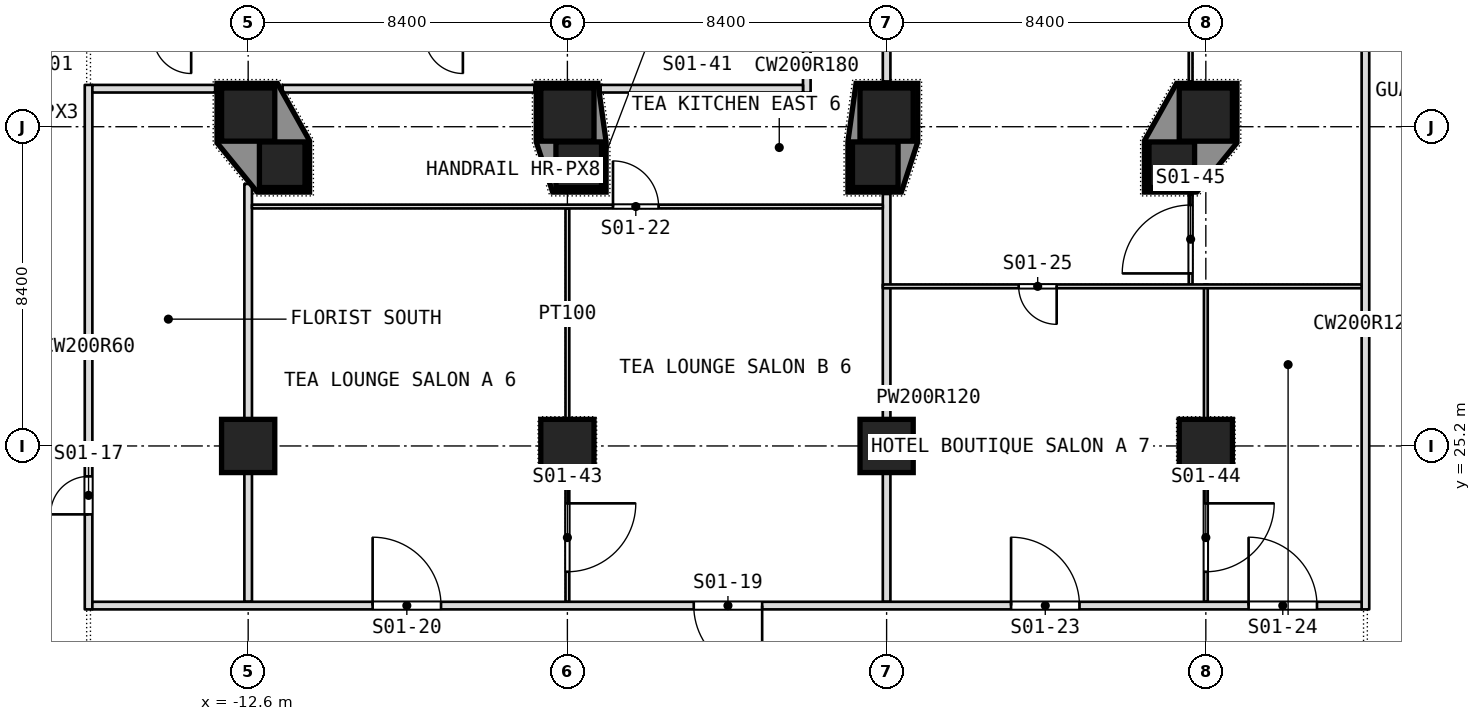
"""IFC4 building model, lengths in metres.
Left out: names, types, materials, properties, quantities, classifications, styles, units other than length and angle.
Written with IfcOpenShell. Run it as: python <this file> out.ifc"""

import sys

from ifc_helpers import new_model, si_unit, direction, frame, frame_2d, origin, origin_2d, place, context, subcontext, project, spatial, polyline, rectangle, outline, extrude, element, fill, save


model = new_model("IFC4")
c1 = context("Model", 3, precision=1e-05, world=origin(), true_north=direction((0.0, 1.0)))
c2 = subcontext(c1, "Body", "Model", "MODEL_VIEW")
j1 = project(units=[si_unit("LENGTHUNIT", "METRE"), si_unit("PLANEANGLEUNIT", "RADIAN")], contexts=[c1])
p1 = place(None, origin())
s1 = spatial("IfcSite", under=j1, at=p1, CompositionType="ELEMENT")
p2 = place(p1, origin())
s2 = spatial("IfcBuilding", under=s1, at=p2, CompositionType="ELEMENT")
p3 = place(p2, origin())
s3 = spatial("IfcBuildingStorey", under=s2, at=p3, CompositionType="ELEMENT", Elevation=0.0)
for number, where, z_axis, x_axis in (
    (1, (-12.6, 25.2, -0.3), (0.0, 0.0, 1.0), (1.0, 0.0, 0.0)),
    (2, (-4.2, 25.2, -0.3), (0.0, 0.0, 1.0), (1.0, 0.0, 0.0)),
    (3, (4.2, 25.2, -0.3), (0.0, 0.0, 1.0), (1.0, 0.0, 0.0)),
    (4, (12.6, 25.2, -0.3), (0.0, 0.0, 1.0), (1.0, 0.0, 0.0)),
    (5, (-12.6, 33.92, -0.3), (0.0, 0.0, 1.0), (1.0, 0.0, 0.0)),
    (6, (-4.2, 33.92, -0.3), (0.0, 0.0, 1.0), (1.0, 0.0, 0.0)),
    (7, (4.2, 33.92, -0.3), (0.0, 0.0, 1.0), (1.0, 0.0, 0.0)),
    (8, (12.6, 33.92, -0.3), (0.0, 0.0, 1.0), (1.0, 0.0, 0.0)),
):
    element("IfcColumn", number, at=place(p3, frame(where, z_axis=z_axis, x_axis=x_axis)), inside=s3, PredefinedType="COLUMN", context=c2, shape_type="SweptSolid", body=[
        extrude(rectangle(XDim=1.4, YDim=1.4, at=origin_2d()), origin(), (0.0, 0.0, 1.0), 8.3),
    ])
for number, where, z_axis, x_axis in (
    (9, (-11.704, 32.6, -0.3), (0.0, 0.0, 1.0), (1.0, 0.0, 0.0)),
    (10, (-3.901, 32.6, -0.3), (0.0, 0.0, 1.0), (1.0, 0.0, 0.0)),
    (11, (3.901, 32.6, -0.3), (0.0, 0.0, 1.0), (1.0, 0.0, 0.0)),
    (12, (11.704, 32.6, -0.3), (0.0, 0.0, 1.0), (1.0, 0.0, 0.0)),
):
    element("IfcColumn", number, at=place(p3, frame(where, z_axis=z_axis, x_axis=x_axis)), inside=s3, PredefinedType="COLUMN", context=c2, shape_type="SweptSolid", body=[
        extrude(rectangle(XDim=1.2, YDim=1.2, at=origin_2d()), origin(), (0.0, 0.0, 1.0), 8.3),
    ])
p4 = place(p3, frame((16.8, 20.9, 0.0), z_axis=(0.0, 0.0, 1.0), x_axis=(0.0, 1.0, 0.0)))
e13 = element("IfcWall", 13, at=p4, inside=s3, PredefinedType="PARTITIONING", context=c2, shape_type="SweptSolid", body=[
    extrude(rectangle(XDim=15.0, YDim=0.2, at=frame_2d((7.5, 0.0))), origin(), (0.0, 0.0, 1.0), 7.68),
])
p5 = place(p3, frame((12.6, 21.1, 0.0), z_axis=(0.0, 0.0, 1.0), x_axis=(0.0, 1.0, 0.0)))
e14 = element("IfcWall", 14, at=p5, inside=s3, PredefinedType="PARTITIONING", context=c2, shape_type="SweptSolid", body=[
    extrude(rectangle(XDim=3.38, YDim=0.1, at=frame_2d((1.69, 0.0))), origin(), (0.0, 0.0, 1.0), 7.68),
])
p6 = place(p5, frame((0.79, 0.0, 0.0)))
e15 = element("IfcOpeningElement", 15, at=p6, cuts=e14, PredefinedType="OPENING", context=c2, shape_type="SweptSolid", body=[
    extrude(rectangle(XDim=1.8, YDim=2.1, at=frame_2d((0.9, 1.05))), frame((0.0, 0.05, 0.0), z_axis=(0.0, -1.0, 0.0), x_axis=(1.0, 0.0, 0.0)), (0.0, 0.0, 1.0), 0.1),
])
p7 = place(p3, frame((12.6, 25.92, 0.0), z_axis=(0.0, 0.0, 1.0), x_axis=(0.0, 1.0, 0.0)))
e16 = element("IfcWall", 16, at=p7, inside=s3, PredefinedType="PARTITIONING", context=c2, shape_type="SweptSolid", body=[
    extrude(rectangle(XDim=3.53, YDim=0.1, at=frame_2d((1.765, 0.0))), origin(), (0.0, 0.0, 1.0), 7.68),
])
p8 = place(p3, frame((12.2, 29.45, 0.0), z_axis=(0.0, 0.0, 1.0), x_axis=(0.0, 1.0, 0.0)))
e17 = element("IfcWall", 17, at=p8, inside=s3, PredefinedType="PARTITIONING", context=c2, shape_type="SweptSolid", body=[
    extrude(rectangle(XDim=2.38, YDim=0.1, at=frame_2d((1.19, 0.0))), origin(), (0.0, 0.0, 1.0), 7.68),
])
p9 = place(p8, frame((0.29, 0.0, 0.0)))
e18 = element("IfcOpeningElement", 18, at=p9, cuts=e17, PredefinedType="OPENING", context=c2, shape_type="SweptSolid", body=[
    extrude(rectangle(XDim=1.8, YDim=2.1, at=frame_2d((0.9, 1.05))), frame((0.0, 0.05, 0.0), z_axis=(0.0, -1.0, 0.0), x_axis=(1.0, 0.0, 0.0)), (0.0, 0.0, 1.0), 0.1),
])
p10 = place(p3, frame((12.2, 34.79, 0.0), z_axis=(0.0, 0.0, 1.0), x_axis=(0.0, 1.0, 0.0)))
e19 = element("IfcWall", 19, at=p10, inside=s3, PredefinedType="PARTITIONING", context=c2, shape_type="SweptSolid", body=[
    extrude(rectangle(XDim=7.51, YDim=0.1, at=frame_2d((3.755, 0.0))), origin(), (0.0, 0.0, 1.0), 7.68),
])
p11 = place(p3, frame((4.2, 21.1, 0.0), z_axis=(0.0, 0.0, 1.0), x_axis=(0.0, 1.0, 0.0)))
e20 = element("IfcWall", 20, at=p11, inside=s3, PredefinedType="PARTITIONING", context=c2, shape_type="SweptSolid", body=[
    extrude(rectangle(XDim=10.73, YDim=0.2, at=frame_2d((5.365, 0.0))), origin(), (0.0, 0.0, 1.0), 7.68),
])
p12 = place(p3, frame((4.2, 34.79, 0.0), z_axis=(0.0, 0.0, 1.0), x_axis=(0.0, 1.0, 0.0)))
e21 = element("IfcWall", 21, at=p12, inside=s3, PredefinedType="PARTITIONING", context=c2, shape_type="SweptSolid", body=[
    extrude(rectangle(XDim=7.51, YDim=0.2, at=frame_2d((3.755, 0.0))), origin(), (0.0, 0.0, 1.0), 7.68),
])
p13 = place(p3, frame((2.1, 34.5, 0.0), z_axis=(0.0, 0.0, 1.0), x_axis=(0.0, 1.0, 0.0)))
e22 = element("IfcWall", 22, at=p13, inside=s3, PredefinedType="PARTITIONING", context=c2, shape_type="SweptSolid", body=[
    extrude(rectangle(XDim=1.4, YDim=0.2, at=frame_2d((0.7, 0.0))), origin(), (0.0, 0.0, 1.0), 7.68),
])
p14 = place(p3, frame((-4.2, 21.1, 0.0), z_axis=(0.0, 0.0, 1.0), x_axis=(0.0, 1.0, 0.0)))
e23 = element("IfcWall", 23, at=p14, inside=s3, PredefinedType="PARTITIONING", context=c2, shape_type="SweptSolid", body=[
    extrude(rectangle(XDim=3.38, YDim=0.1, at=frame_2d((1.69, 0.0))), origin(), (0.0, 0.0, 1.0), 7.68),
])
p15 = place(p14, frame((0.79, 0.0, 0.0)))
e24 = element("IfcOpeningElement", 24, at=p15, cuts=e23, PredefinedType="OPENING", context=c2, shape_type="SweptSolid", body=[
    extrude(rectangle(XDim=1.8, YDim=2.1, at=frame_2d((0.9, 1.05))), frame((0.0, 0.05, 0.0), z_axis=(0.0, -1.0, 0.0), x_axis=(1.0, 0.0, 0.0)), (0.0, 0.0, 1.0), 0.1),
])
p16 = place(p3, frame((-4.2, 25.92, 0.0), z_axis=(0.0, 0.0, 1.0), x_axis=(0.0, 1.0, 0.0)))
e25 = element("IfcWall", 25, at=p16, inside=s3, PredefinedType="PARTITIONING", context=c2, shape_type="SweptSolid", body=[
    extrude(rectangle(XDim=5.53, YDim=0.1, at=frame_2d((2.765, 0.0))), origin(), (0.0, 0.0, 1.0), 7.68),
])
p17 = place(p3, frame((-12.6, 21.1, 0.0), z_axis=(0.0, 0.0, 1.0), x_axis=(0.0, 1.0, 0.0)))
e26 = element("IfcWall", 26, at=p17, inside=s3, PredefinedType="PARTITIONING", context=c2, shape_type="SweptSolid", body=[
    extrude(rectangle(XDim=10.994, YDim=0.2, at=frame_2d((5.497, 0.0))), origin(), (0.0, 0.0, 1.0), 7.68),
])
p18 = place(p3, frame((-16.8, 20.9, 0.0), z_axis=(0.0, 0.0, 1.0), x_axis=(0.0, 1.0, 0.0)))
e27 = element("IfcWall", 27, at=p18, inside=s3, PredefinedType="PARTITIONING", context=c2, shape_type="SweptSolid", body=[
    extrude(rectangle(XDim=13.8, YDim=0.2, at=frame_2d((6.9, 0.0))), origin(), (0.0, 0.0, 1.0), 7.68),
])
p19 = place(p18, frame((2.5, 0.0, 0.0)))
e28 = element("IfcOpeningElement", 28, at=p19, cuts=e27, PredefinedType="OPENING", context=c2, shape_type="SweptSolid", body=[
    extrude(rectangle(XDim=1.0, YDim=2.1, at=frame_2d((0.5, 1.05))), frame((0.0, 0.1, 0.0), z_axis=(0.0, -1.0, 0.0), x_axis=(1.0, 0.0, 0.0)), (0.0, 0.0, 1.0), 0.2),
])
p20 = place(p3, frame((-16.7, 21.0, 0.0), z_axis=(0.0, 0.0, 1.0), x_axis=(1.0, 0.0, 0.0)))
e29 = element("IfcWall", 29, at=p20, inside=s3, PredefinedType="PARTITIONING", context=c2, shape_type="SweptSolid", body=[
    extrude(rectangle(XDim=33.4, YDim=0.2, at=frame_2d((16.7, 0.0))), origin(), (0.0, 0.0, 1.0), 7.68),
])
p21 = place(p20, frame((15.825, 0.0, 0.0)))
e30 = element("IfcOpeningElement", 30, at=p21, cuts=e29, PredefinedType="OPENING", context=c2, shape_type="SweptSolid", body=[
    extrude(rectangle(XDim=1.8, YDim=2.1, at=frame_2d((0.9, 1.05))), frame((0.0, 0.1, 0.0), z_axis=(0.0, -1.0, 0.0), x_axis=(1.0, 0.0, 0.0)), (0.0, 0.0, 1.0), 0.2),
])
p22 = place(p20, frame((7.375, 0.0, 0.0)))
e31 = element("IfcOpeningElement", 31, at=p22, cuts=e29, PredefinedType="OPENING", context=c2, shape_type="SweptSolid", body=[
    extrude(rectangle(XDim=1.8, YDim=2.1, at=frame_2d((0.9, 1.05))), frame((0.0, 0.1, 0.0), z_axis=(0.0, -1.0, 0.0), x_axis=(1.0, 0.0, 0.0)), (0.0, 0.0, 1.0), 0.2),
])
p23 = place(p20, frame((24.175, 0.0, 0.0)))
e32 = element("IfcOpeningElement", 32, at=p23, cuts=e29, PredefinedType="OPENING", context=c2, shape_type="SweptSolid", body=[
    extrude(rectangle(XDim=1.8, YDim=2.1, at=frame_2d((0.9, 1.05))), frame((0.0, 0.1, 0.0), z_axis=(0.0, -1.0, 0.0), x_axis=(1.0, 0.0, 0.0)), (0.0, 0.0, 1.0), 0.2),
])
p24 = place(p20, frame((30.425, 0.0, 0.0)))
e33 = element("IfcOpeningElement", 33, at=p24, cuts=e29, PredefinedType="OPENING", context=c2, shape_type="SweptSolid", body=[
    extrude(rectangle(XDim=1.8, YDim=2.1, at=frame_2d((0.9, 1.05))), frame((0.0, 0.1, 0.0), z_axis=(0.0, -1.0, 0.0), x_axis=(1.0, 0.0, 0.0)), (0.0, 0.0, 1.0), 0.2),
])
p25 = place(p3, frame((4.1, 29.4, 0.0), z_axis=(0.0, 0.0, 1.0), x_axis=(1.0, 0.0, 0.0)))
e34 = element("IfcWall", 34, at=p25, inside=s3, PredefinedType="PARTITIONING", context=c2, shape_type="SweptSolid", body=[
    extrude(rectangle(XDim=12.6, YDim=0.1, at=frame_2d((6.3, 0.0))), origin(), (0.0, 0.0, 1.0), 7.68),
])
p26 = place(p25, frame((3.575, 0.0, 0.0)))
e35 = element("IfcOpeningElement", 35, at=p26, cuts=e34, PredefinedType="OPENING", context=c2, shape_type="SweptSolid", body=[
    extrude(rectangle(XDim=1.0, YDim=2.1, at=frame_2d((0.5, 1.05))), frame((0.0, 0.05, 0.0), z_axis=(0.0, -1.0, 0.0), x_axis=(1.0, 0.0, 0.0)), (0.0, 0.0, 1.0), 0.1),
])
p27 = place(p3, frame((-12.5, 31.5, 0.0), z_axis=(0.0, 0.0, 1.0), x_axis=(1.0, 0.0, 0.0)))
e36 = element("IfcWall", 36, at=p27, inside=s3, PredefinedType="PARTITIONING", context=c2, shape_type="SweptSolid", body=[
    extrude(rectangle(XDim=16.6, YDim=0.1, at=frame_2d((8.3, 0.0))), origin(), (0.0, 0.0, 1.0), 7.68),
])
p28 = place(p27, frame((9.5, 0.0, 0.0)))
e37 = element("IfcOpeningElement", 37, at=p28, cuts=e36, PredefinedType="OPENING", context=c2, shape_type="SweptSolid", body=[
    extrude(rectangle(XDim=1.2, YDim=2.1, at=frame_2d((0.6, 1.05))), frame((0.0, 0.05, 0.0), z_axis=(0.0, -1.0, 0.0), x_axis=(1.0, 0.0, 0.0)), (0.0, 0.0, 1.0), 0.1),
])
p29 = place(p3, frame((-16.7, 34.6, 0.0), z_axis=(0.0, 0.0, 1.0), x_axis=(1.0, 0.0, 0.0)))
e38 = element("IfcWall", 38, at=p29, inside=s3, PredefinedType="PARTITIONING", context=c2, shape_type="SweptSolid", body=[
    extrude(rectangle(XDim=3.23, YDim=0.2, at=frame_2d((1.615, 0.0))), origin(), (0.0, 0.0, 1.0), 7.68),
])
p30 = place(p3, frame((-11.694, 34.6, 0.0), z_axis=(0.0, 0.0, 1.0), x_axis=(1.0, 0.0, 0.0)))
e39 = element("IfcWall", 39, at=p30, inside=s3, PredefinedType="PARTITIONING", context=c2, shape_type="SweptSolid", body=[
    extrude(rectangle(XDim=6.624, YDim=0.2, at=frame_2d((3.312, 0.0))), origin(), (0.0, 0.0, 1.0), 7.68),
])
p31 = place(p3, frame((-3.326, 34.6, 0.0), z_axis=(0.0, 0.0, 1.0), x_axis=(1.0, 0.0, 0.0)))
e40 = element("IfcWall", 40, at=p31, inside=s3, PredefinedType="PARTITIONING", context=c2, shape_type="SweptSolid", body=[
    extrude(rectangle(XDim=5.326, YDim=0.2, at=frame_2d((2.663, 0.0))), origin(), (0.0, 0.0, 1.0), 7.68),
])
p32 = place(p3, origin())
e41 = element("IfcWall", 41, at=p32, inside=s3, PredefinedType="SOLIDWALL", context=c2, shape_type="SweptSolid", body=[
    extrude(outline(polyline([(-13.42, 34.74), (-11.83, 34.74), (-10.984, 33.231), (-10.984, 31.88), (-12.361, 31.88), (-13.42, 33.177), (-13.42, 34.74)]), holes=[polyline([(-11.104, 32.0), (-11.104, 33.2), (-12.304, 33.2), (-12.304, 32.0), (-11.104, 32.0)]), polyline([(-11.9, 33.22), (-11.9, 34.62), (-13.3, 34.62), (-13.3, 33.22), (-11.9, 33.22)])]), origin(), (0.0, 0.0, 1.0), 8.0),
])
p33 = place(p3, origin())
e42 = element("IfcWall", 42, at=p33, inside=s3, PredefinedType="SOLIDWALL", context=c2, shape_type="SweptSolid", body=[
    extrude(outline(polyline([(-5.02, 34.74), (-3.396, 34.74), (-3.181, 33.208), (-3.181, 31.88), (-4.588, 31.88), (-5.02, 33.201), (-5.02, 34.74)]), holes=[polyline([(-3.302, 32.0), (-3.302, 33.2), (-4.501, 33.2), (-4.501, 32.0), (-3.302, 32.0)]), polyline([(-3.5, 33.22), (-3.5, 34.62), (-4.9, 34.62), (-4.9, 33.22), (-3.5, 33.22)])]), origin(), (0.0, 0.0, 1.0), 8.0),
])
p34 = place(p3, origin())
e43 = element("IfcWall", 43, at=p34, inside=s3, PredefinedType="SOLIDWALL", context=c2, shape_type="SweptSolid", body=[
    extrude(outline(polyline([(3.181, 33.208), (3.396, 34.74), (5.02, 34.74), (5.02, 33.201), (4.588, 31.88), (3.181, 31.88), (3.181, 33.208)]), holes=[polyline([(3.5, 33.22), (4.9, 33.22), (4.9, 34.62), (3.5, 34.62), (3.5, 33.22)]), polyline([(3.302, 32.0), (4.501, 32.0), (4.501, 33.2), (3.302, 33.2), (3.302, 32.0)])]), origin(), (0.0, 0.0, 1.0), 8.0),
])
p35 = place(p3, origin())
e44 = element("IfcWall", 44, at=p35, inside=s3, PredefinedType="SOLIDWALL", context=c2, shape_type="SweptSolid", body=[
    extrude(outline(polyline([(11.83, 34.74), (13.42, 34.74), (13.42, 33.177), (12.361, 31.88), (10.984, 31.88), (10.984, 33.231), (11.83, 34.74)]), holes=[polyline([(13.3, 33.22), (13.3, 34.62), (11.9, 34.62), (11.9, 33.22), (13.3, 33.22)]), polyline([(12.304, 32.0), (12.304, 33.2), (11.104, 33.2), (11.104, 32.0), (12.304, 32.0)])]), origin(), (0.0, 0.0, 1.0), 8.0),
])
p36 = place(p6, origin())
e45 = element("IfcDoor", 45, at=p36, inside=s3, OperationType="DOUBLE_DOOR_SINGLE_SWING", PredefinedType="DOOR", context=c2, shape_type="SweptSolid", body=[
    extrude(rectangle(XDim=1.8, YDim=2.1, at=frame_2d((0.9, 1.05))), frame((0.0, 0.025, 0.0), z_axis=(0.0, -1.0, 0.0), x_axis=(1.0, 0.0, 0.0)), (0.0, 0.0, 1.0), 0.05),
])
fill(e15, e45)
p37 = place(p9, origin())
e46 = element("IfcDoor", 46, at=p37, inside=s3, OperationType="DOUBLE_DOOR_SINGLE_SWING", PredefinedType="DOOR", context=c2, shape_type="SweptSolid", body=[
    extrude(rectangle(XDim=1.8, YDim=2.1, at=frame_2d((0.9, 1.05))), frame((0.0, 0.025, 0.0), z_axis=(0.0, -1.0, 0.0), x_axis=(1.0, 0.0, 0.0)), (0.0, 0.0, 1.0), 0.05),
])
fill(e18, e46)
p38 = place(p15, origin())
e47 = element("IfcDoor", 47, at=p38, inside=s3, OperationType="DOUBLE_DOOR_SINGLE_SWING", PredefinedType="DOOR", context=c2, shape_type="SweptSolid", body=[
    extrude(rectangle(XDim=1.8, YDim=2.1, at=frame_2d((0.9, 1.05))), frame((0.0, 0.025, 0.0), z_axis=(0.0, -1.0, 0.0), x_axis=(1.0, 0.0, 0.0)), (0.0, 0.0, 1.0), 0.05),
])
fill(e24, e47)
p39 = place(p19, origin())
e48 = element("IfcDoor", 48, at=p39, inside=s3, OperationType="SINGLE_SWING_LEFT", PredefinedType="DOOR", context=c2, shape_type="SweptSolid", body=[
    extrude(rectangle(XDim=1.0, YDim=2.1, at=frame_2d((0.5, 1.05))), frame((0.0, 0.025, 0.0), z_axis=(0.0, -1.0, 0.0), x_axis=(1.0, 0.0, 0.0)), (0.0, 0.0, 1.0), 0.05),
])
fill(e28, e48)
p40 = place(p21, origin())
e49 = element("IfcDoor", 49, at=p40, inside=s3, OperationType="DOUBLE_DOOR_SINGLE_SWING", PredefinedType="DOOR", context=c2, shape_type="SweptSolid", body=[
    extrude(rectangle(XDim=1.8, YDim=2.1, at=frame_2d((0.9, 1.05))), frame((0.0, 0.025, 0.0), z_axis=(0.0, -1.0, 0.0), x_axis=(1.0, 0.0, 0.0)), (0.0, 0.0, 1.0), 0.05),
])
fill(e30, e49)
p41 = place(p22, origin())
e50 = element("IfcDoor", 50, at=p41, inside=s3, OperationType="DOUBLE_DOOR_SINGLE_SWING", PredefinedType="DOOR", context=c2, shape_type="SweptSolid", body=[
    extrude(rectangle(XDim=1.8, YDim=2.1, at=frame_2d((0.9, 1.05))), frame((0.0, 0.025, 0.0), z_axis=(0.0, -1.0, 0.0), x_axis=(1.0, 0.0, 0.0)), (0.0, 0.0, 1.0), 0.05),
])
fill(e31, e50)
p42 = place(p23, origin())
e51 = element("IfcDoor", 51, at=p42, inside=s3, OperationType="DOUBLE_DOOR_SINGLE_SWING", PredefinedType="DOOR", context=c2, shape_type="SweptSolid", body=[
    extrude(rectangle(XDim=1.8, YDim=2.1, at=frame_2d((0.9, 1.05))), frame((0.0, 0.025, 0.0), z_axis=(0.0, -1.0, 0.0), x_axis=(1.0, 0.0, 0.0)), (0.0, 0.0, 1.0), 0.05),
])
fill(e32, e51)
p43 = place(p24, origin())
e52 = element("IfcDoor", 52, at=p43, inside=s3, OperationType="DOUBLE_DOOR_SINGLE_SWING", PredefinedType="DOOR", context=c2, shape_type="SweptSolid", body=[
    extrude(rectangle(XDim=1.8, YDim=2.1, at=frame_2d((0.9, 1.05))), frame((0.0, 0.025, 0.0), z_axis=(0.0, -1.0, 0.0), x_axis=(1.0, 0.0, 0.0)), (0.0, 0.0, 1.0), 0.05),
])
fill(e33, e52)
p44 = place(p26, origin())
e53 = element("IfcDoor", 53, at=p44, inside=s3, OperationType="SINGLE_SWING_LEFT", PredefinedType="DOOR", context=c2, shape_type="SweptSolid", body=[
    extrude(rectangle(XDim=1.0, YDim=2.1, at=frame_2d((0.5, 1.05))), frame((0.0, 0.025, 0.0), z_axis=(0.0, -1.0, 0.0), x_axis=(1.0, 0.0, 0.0)), (0.0, 0.0, 1.0), 0.05),
])
fill(e35, e53)
p45 = place(p28, origin())
e54 = element("IfcDoor", 54, at=p45, inside=s3, OperationType="SINGLE_SWING_LEFT", PredefinedType="DOOR", context=c2, shape_type="SweptSolid", body=[
    extrude(rectangle(XDim=1.2, YDim=2.1, at=frame_2d((0.6, 1.05))), frame((0.0, 0.025, 0.0), z_axis=(0.0, -1.0, 0.0), x_axis=(1.0, 0.0, 0.0)), (0.0, 0.0, 1.0), 0.05),
])
fill(e37, e54)
save(model, sys.argv[1])
